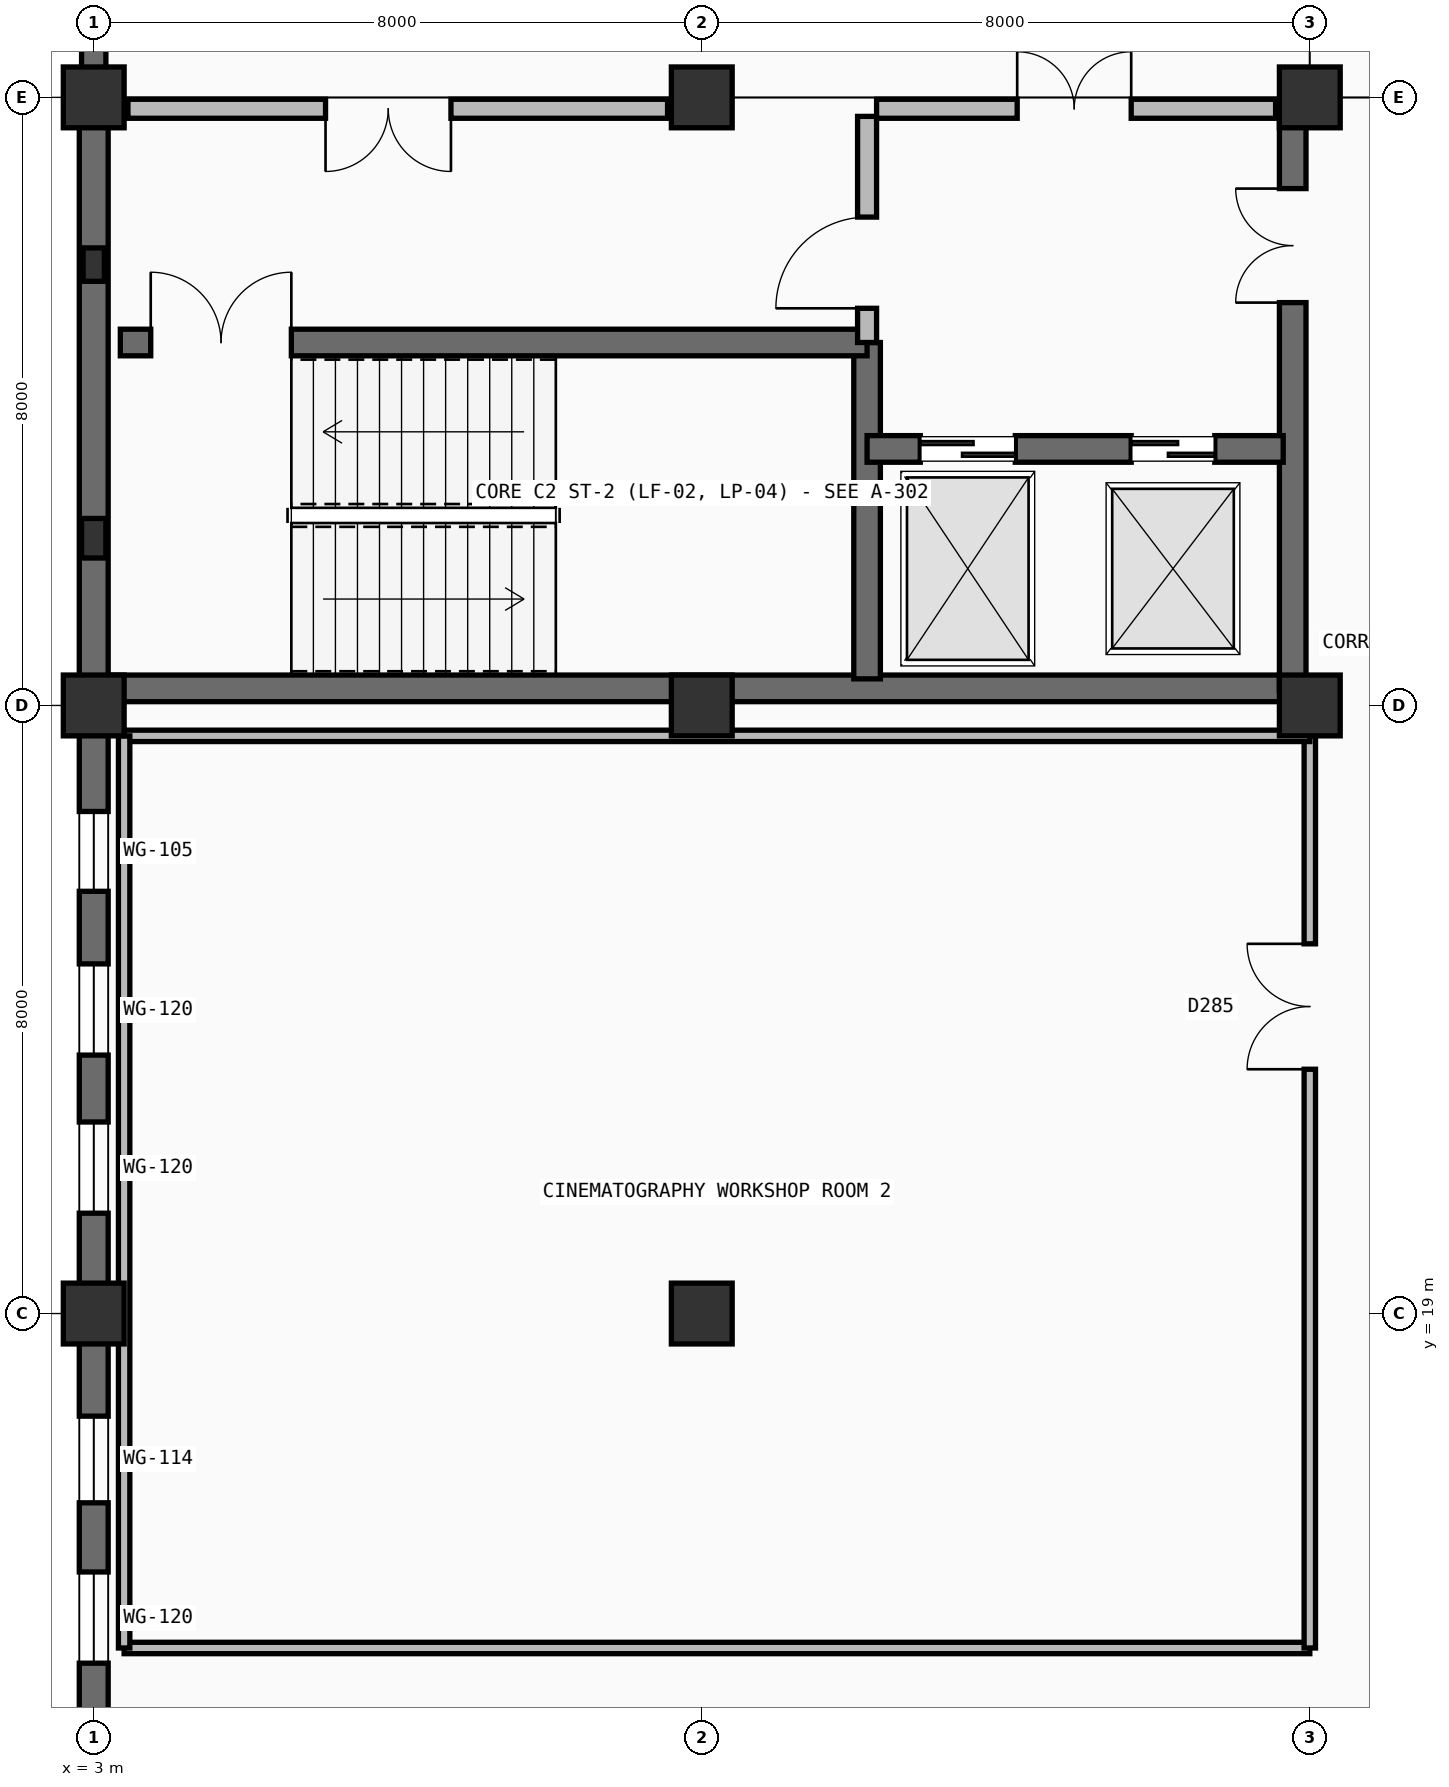
"""IFC4 building model, lengths in metres.
Left out: names, types, materials, properties, quantities, classifications, styles, units other than length and angle.
Written with IfcOpenShell. Run it as: python <this file> out.ifc"""

import sys

from ifc_helpers import new_model, si_unit, direction, frame, frame_2d, origin, origin_2d, place, context, subcontext, project, spatial, rectangle, extrude, element, fill, save


model = new_model("IFC4")
c1 = context("Model", 3, precision=1e-05, world=origin(), true_north=direction((0.0, 1.0)))
c2 = subcontext(c1, "Body", "Model", "MODEL_VIEW")
j1 = project(units=[si_unit("LENGTHUNIT", "METRE"), si_unit("PLANEANGLEUNIT", "RADIAN")], contexts=[c1])
p1 = place(None, origin())
s1 = spatial("IfcSite", under=j1, at=p1, CompositionType="ELEMENT")
p2 = place(p1, origin())
s2 = spatial("IfcBuilding", under=s1, at=p2, CompositionType="ELEMENT")
p3 = place(p2, frame((0.0, 0.0, 14.4)))
s3 = spatial("IfcBuildingStorey", under=s2, at=p3, CompositionType="ELEMENT", Elevation=14.4)
for number, where, z_axis, x_axis in (
    (1, (3.0, 19.0, 0.0), (0.0, 0.0, 1.0), (1.0, 0.0, 0.0)),
    (2, (3.0, 27.0, 0.0), (0.0, 0.0, 1.0), (1.0, 0.0, 0.0)),
    (3, (3.0, 35.0, 0.0), (0.0, 0.0, 1.0), (1.0, 0.0, 0.0)),
    (4, (11.0, 19.0, 0.0), (0.0, 0.0, 1.0), (1.0, 0.0, 0.0)),
    (5, (11.0, 27.0, 0.0), (0.0, 0.0, 1.0), (1.0, 0.0, 0.0)),
    (6, (11.0, 35.0, 0.0), (0.0, 0.0, 1.0), (1.0, 0.0, 0.0)),
    (7, (19.0, 27.0, 0.0), (0.0, 0.0, 1.0), (1.0, 0.0, 0.0)),
    (8, (19.0, 35.0, 0.0), (0.0, 0.0, 1.0), (1.0, 0.0, 0.0)),
):
    element("IfcColumn", number, at=place(p3, frame(where, z_axis=z_axis, x_axis=x_axis)), inside=s3, PredefinedType="COLUMN", context=c2, shape_type="SweptSolid", body=[
        extrude(rectangle(XDim=0.8, YDim=0.8, at=origin_2d()), origin(), (0.0, 0.0, 1.0), 4.5),
    ])
p4 = place(p3, frame((3.0, 29.2, 0.0), z_axis=(0.0, 0.0, 1.0), x_axis=(0.0, 1.0, 0.0)))
e9 = element("IfcColumn", 9, at=p4, inside=s3, PredefinedType="PILASTER", context=c2, shape_type="SweptSolid", body=[
    extrude(rectangle(XDim=0.52, YDim=0.32, at=origin_2d()), origin(), (0.0, 0.0, 1.0), 4.5),
])
p5 = place(p3, frame((3.0, 32.8, 0.0), z_axis=(0.0, 0.0, 1.0), x_axis=(0.0, 1.0, 0.0)))
e10 = element("IfcColumn", 10, at=p5, inside=s3, PredefinedType="PILASTER", context=c2, shape_type="SweptSolid", body=[
    extrude(rectangle(XDim=0.44, YDim=0.28, at=origin_2d()), origin(), (0.0, 0.0, 1.0), 4.5),
])
p6 = place(p3, frame((3.0, 11.0, 0.0), z_axis=(0.0, 0.0, 1.0), x_axis=(0.0, 1.0, 0.0)))
e11 = element("IfcWall", 11, at=p6, inside=s3, PredefinedType="SOLIDWALL", context=c2, shape_type="SweptSolid", body=[
    extrude(rectangle(XDim=8.0, YDim=0.38, at=frame_2d((4.0, 0.0))), origin(), (0.0, 0.0, 1.0), 4.5),
])
p7 = place(p6, frame((1.26, 0.0, 1.05)))
e12 = element("IfcOpeningElement", 12, at=p7, cuts=e11, PredefinedType="OPENING", context=c2, shape_type="SweptSolid", body=[
    extrude(rectangle(XDim=1.32, YDim=2.05, at=frame_2d((0.66, 1.025))), frame((0.0, 0.2, 0.0), z_axis=(0.0, -1.0, 0.0), x_axis=(1.0, 0.0, 0.0)), (0.0, 0.0, 1.0), 0.4),
])
p8 = place(p6, frame((3.4, 0.0, 1.05)))
e13 = element("IfcOpeningElement", 13, at=p8, cuts=e11, PredefinedType="OPENING", context=c2, shape_type="SweptSolid", body=[
    extrude(rectangle(XDim=1.2, YDim=1.9, at=frame_2d((0.6, 0.95))), frame((0.0, 0.2, 0.0), z_axis=(0.0, -1.0, 0.0), x_axis=(1.0, 0.0, 0.0)), (0.0, 0.0, 1.0), 0.4),
])
p9 = place(p6, frame((5.51, 0.0, 1.05)))
e14 = element("IfcOpeningElement", 14, at=p9, cuts=e11, PredefinedType="OPENING", context=c2, shape_type="SweptSolid", body=[
    extrude(rectangle(XDim=1.14, YDim=1.8, at=frame_2d((0.57, 0.9))), frame((0.0, 0.2, 0.0), z_axis=(0.0, -1.0, 0.0), x_axis=(1.0, 0.0, 0.0)), (0.0, 0.0, 1.0), 0.4),
])
p10 = place(p3, frame((3.0, 19.0, 0.0), z_axis=(0.0, 0.0, 1.0), x_axis=(0.0, 1.0, 0.0)))
e15 = element("IfcWall", 15, at=p10, inside=s3, PredefinedType="SOLIDWALL", context=c2, shape_type="SweptSolid", body=[
    extrude(rectangle(XDim=8.0, YDim=0.38, at=frame_2d((4.0, 0.0))), origin(), (0.0, 0.0, 1.0), 4.5),
])
p11 = place(p10, frame((1.32, 0.0, 1.05)))
e16 = element("IfcOpeningElement", 16, at=p11, cuts=e15, PredefinedType="OPENING", context=c2, shape_type="SweptSolid", body=[
    extrude(rectangle(XDim=1.2, YDim=1.9, at=frame_2d((0.6, 0.95))), frame((0.0, 0.2, 0.0), z_axis=(0.0, -1.0, 0.0), x_axis=(1.0, 0.0, 0.0)), (0.0, 0.0, 1.0), 0.4),
])
p12 = place(p10, frame((3.4, 0.0, 1.05)))
e17 = element("IfcOpeningElement", 17, at=p12, cuts=e15, PredefinedType="OPENING", context=c2, shape_type="SweptSolid", body=[
    extrude(rectangle(XDim=1.2, YDim=1.9, at=frame_2d((0.6, 0.95))), frame((0.0, 0.2, 0.0), z_axis=(0.0, -1.0, 0.0), x_axis=(1.0, 0.0, 0.0)), (0.0, 0.0, 1.0), 0.4),
])
p13 = place(p10, frame((5.555, 0.0, 1.05)))
e18 = element("IfcOpeningElement", 18, at=p13, cuts=e15, PredefinedType="OPENING", context=c2, shape_type="SweptSolid", body=[
    extrude(rectangle(XDim=1.05, YDim=1.7, at=frame_2d((0.525, 0.85))), frame((0.0, 0.2, 0.0), z_axis=(0.0, -1.0, 0.0), x_axis=(1.0, 0.0, 0.0)), (0.0, 0.0, 1.0), 0.4),
])
p14 = place(p3, frame((3.0, 27.0, 0.0), z_axis=(0.0, 0.0, 1.0), x_axis=(0.0, 1.0, 0.0)))
e19 = element("IfcWall", 19, at=p14, inside=s3, PredefinedType="SOLIDWALL", context=c2, shape_type="SweptSolid", body=[
    extrude(rectangle(XDim=8.0, YDim=0.38, at=frame_2d((4.0, 0.0))), origin(), (0.0, 0.0, 1.0), 4.5),
])
p15 = place(p3, frame((3.0, 35.0, 0.0), z_axis=(0.0, 0.0, 1.0), x_axis=(0.0, 1.0, 0.0)))
e20 = element("IfcWall", 20, at=p15, inside=s3, PredefinedType="SOLIDWALL", context=c2, shape_type="SweptSolid", body=[
    extrude(rectangle(XDim=8.0, YDim=0.32, at=frame_2d((4.0, 0.0))), origin(), (0.0, 0.0, 1.0), 4.5),
])
p16 = place(p15, frame((3.1, 0.0, 1.1)))
e21 = element("IfcOpeningElement", 21, at=p16, cuts=e20, PredefinedType="OPENING", context=c2, shape_type="SweptSolid", body=[
    extrude(rectangle(XDim=1.8, YDim=0.85, at=frame_2d((0.9, 0.425))), frame((0.0, 0.17, 0.0), z_axis=(0.0, -1.0, 0.0), x_axis=(1.0, 0.0, 0.0)), (0.0, 0.0, 1.0), 0.34),
])
p17 = place(p3, frame((3.2, 27.225, 0.0), z_axis=(0.0, 0.0, 1.0), x_axis=(1.0, 0.0, 0.0)))
e22 = element("IfcWall", 22, at=p17, inside=s3, PredefinedType="SHEAR", context=c2, shape_type="SweptSolid", body=[
    extrude(rectangle(XDim=15.6, YDim=0.35, at=frame_2d((7.8, 0.0))), origin(), (0.0, 0.0, 1.0), 4.2),
])
p18 = place(p3, frame((13.175, 27.35, 0.0), z_axis=(0.0, 0.0, 1.0), x_axis=(0.0, 1.0, 0.0)))
e23 = element("IfcWall", 23, at=p18, inside=s3, PredefinedType="SHEAR", context=c2, shape_type="SweptSolid", body=[
    extrude(rectangle(XDim=4.425, YDim=0.35, at=frame_2d((2.212, 0.0))), origin(), (0.0, 0.0, 1.0), 4.2),
])
p19 = place(p3, frame((18.775, 27.2, 0.0), z_axis=(0.0, 0.0, 1.0), x_axis=(0.0, 1.0, 0.0)))
e24 = element("IfcWall", 24, at=p19, inside=s3, PredefinedType="SHEAR", context=c2, shape_type="SweptSolid", body=[
    extrude(rectangle(XDim=7.6, YDim=0.35, at=frame_2d((3.8, 0.0))), origin(), (0.0, 0.0, 1.0), 4.2),
])
p20 = place(p19, frame((5.1, 0.0, 0.0)))
e25 = element("IfcOpeningElement", 25, at=p20, cuts=e24, PredefinedType="OPENING", context=c2, shape_type="SweptSolid", body=[
    extrude(rectangle(XDim=1.5, YDim=2.2, at=frame_2d((0.75, 1.1))), frame((0.0, 0.185, 0.0), z_axis=(0.0, -1.0, 0.0), x_axis=(1.0, 0.0, 0.0)), (0.0, 0.0, 1.0), 0.37),
])
p21 = place(p3, frame((3.35, 31.775, 0.0), z_axis=(0.0, 0.0, 1.0), x_axis=(1.0, 0.0, 0.0)))
e26 = element("IfcWall", 26, at=p21, inside=s3, PredefinedType="SHEAR", context=c2, shape_type="SweptSolid", body=[
    extrude(rectangle(XDim=9.825, YDim=0.35, at=frame_2d((4.913, 0.0))), origin(), (0.0, 0.0, 1.0), 4.2),
])
p22 = place(p21, frame((0.4, 0.0, 0.0)))
e27 = element("IfcOpeningElement", 27, at=p22, cuts=e26, PredefinedType="OPENING", context=c2, shape_type="SweptSolid", body=[
    extrude(rectangle(XDim=1.85, YDim=2.25, at=frame_2d((0.925, 1.125))), frame((0.0, 0.185, 0.0), z_axis=(0.0, -1.0, 0.0), x_axis=(1.0, 0.0, 0.0)), (0.0, 0.0, 1.0), 0.37),
])
p23 = place(p3, frame((13.175, 30.375, 0.0), z_axis=(0.0, 0.0, 1.0), x_axis=(1.0, 0.0, 0.0)))
e28 = element("IfcWall", 28, at=p23, inside=s3, PredefinedType="SHEAR", context=c2, shape_type="SweptSolid", body=[
    extrude(rectangle(XDim=5.475, YDim=0.35, at=frame_2d((2.737, 0.0))), origin(), (0.0, 0.0, 1.0), 4.2),
])
p24 = place(p23, frame((0.7, 0.0, 0.0)))
e29 = element("IfcOpeningElement", 29, at=p24, cuts=e28, PredefinedType="OPENING", context=c2, shape_type="SweptSolid", body=[
    extrude(rectangle(XDim=1.25, YDim=2.25, at=frame_2d((0.625, 1.125))), frame((0.0, 0.185, 0.0), z_axis=(0.0, -1.0, 0.0), x_axis=(1.0, 0.0, 0.0)), (0.0, 0.0, 1.0), 0.37),
])
p25 = place(p23, frame((3.475, 0.0, 0.0)))
e30 = element("IfcOpeningElement", 30, at=p25, cuts=e28, PredefinedType="OPENING", context=c2, shape_type="SweptSolid", body=[
    extrude(rectangle(XDim=1.1, YDim=2.2, at=frame_2d((0.55, 1.1))), frame((0.0, 0.185, 0.0), z_axis=(0.0, -1.0, 0.0), x_axis=(1.0, 0.0, 0.0)), (0.0, 0.0, 1.0), 0.37),
])
p26 = place(p3, frame((13.175, 31.775, 0.0), z_axis=(0.0, 0.0, 1.0), x_axis=(0.0, 1.0, 0.0)))
e31 = element("IfcWall", 31, at=p26, inside=s3, PredefinedType="PARTITIONING", context=c2, shape_type="SweptSolid", body=[
    extrude(rectangle(XDim=2.975, YDim=0.25, at=frame_2d((1.488, 0.0))), origin(), (0.0, 0.0, 1.0), 4.2),
])
p27 = place(p26, frame((0.45, 0.0, 0.0)))
e32 = element("IfcOpeningElement", 32, at=p27, cuts=e31, PredefinedType="OPENING", context=c2, shape_type="SweptSolid", body=[
    extrude(rectangle(XDim=1.2, YDim=2.2, at=frame_2d((0.6, 1.1))), frame((0.0, 0.135, 0.0), z_axis=(0.0, -1.0, 0.0), x_axis=(1.0, 0.0, 0.0)), (0.0, 0.0, 1.0), 0.27),
])
p28 = place(p3, frame((3.45, 34.85, 0.0), z_axis=(0.0, 0.0, 1.0), x_axis=(1.0, 0.0, 0.0)))
e33 = element("IfcWall", 33, at=p28, inside=s3, PredefinedType="PARTITIONING", context=c2, shape_type="SweptSolid", body=[
    extrude(rectangle(XDim=7.1, YDim=0.25, at=frame_2d((3.55, 0.0))), origin(), (0.0, 0.0, 1.0), 3.535),
])
p29 = place(p28, frame((2.6, 0.0, 0.0)))
e34 = element("IfcOpeningElement", 34, at=p29, cuts=e33, PredefinedType="OPENING", context=c2, shape_type="SweptSolid", body=[
    extrude(rectangle(XDim=1.65, YDim=2.25, at=frame_2d((0.825, 1.125))), frame((0.0, 0.135, 0.0), z_axis=(0.0, -1.0, 0.0), x_axis=(1.0, 0.0, 0.0)), (0.0, 0.0, 1.0), 0.27),
])
p30 = place(p3, frame((13.3, 34.85, 0.0), z_axis=(0.0, 0.0, 1.0), x_axis=(1.0, 0.0, 0.0)))
e35 = element("IfcWall", 35, at=p30, inside=s3, PredefinedType="PARTITIONING", context=c2, shape_type="SweptSolid", body=[
    extrude(rectangle(XDim=5.25, YDim=0.25, at=frame_2d((2.625, 0.0))), origin(), (0.0, 0.0, 1.0), 3.535),
])
p31 = place(p30, frame((1.85, 0.0, 0.0)))
e36 = element("IfcOpeningElement", 36, at=p31, cuts=e35, PredefinedType="OPENING", context=c2, shape_type="SweptSolid", body=[
    extrude(rectangle(XDim=1.5, YDim=2.2, at=frame_2d((0.75, 1.1))), frame((0.0, 0.135, 0.0), z_axis=(0.0, -1.0, 0.0), x_axis=(1.0, 0.0, 0.0)), (0.0, 0.0, 1.0), 0.27),
])
p32 = place(p3, frame((3.4, 14.6, 0.0), z_axis=(0.0, 0.0, 1.0), x_axis=(1.0, 0.0, 0.0)))
e37 = element("IfcWall", 37, at=p32, inside=s3, PredefinedType="PARTITIONING", context=c2, shape_type="SweptSolid", body=[
    extrude(rectangle(XDim=15.6, YDim=0.15, at=frame_2d((7.8, 0.0))), origin(), (0.0, 0.0, 1.0), 4.2),
])
p33 = place(p3, frame((19.0, 14.6, 0.0), z_axis=(0.0, 0.0, 1.0), x_axis=(0.0, 1.0, 0.0)))
e38 = element("IfcWall", 38, at=p33, inside=s3, PredefinedType="PARTITIONING", context=c2, shape_type="SweptSolid", body=[
    extrude(rectangle(XDim=12.0, YDim=0.15, at=frame_2d((6.0, 0.0))), origin(), (0.0, 0.0, 1.0), 2.935),
])
p34 = place(p33, frame((7.614, 0.0, 0.0)))
e39 = element("IfcOpeningElement", 39, at=p34, cuts=e38, PredefinedType="OPENING", context=c2, shape_type="SweptSolid", body=[
    extrude(rectangle(XDim=1.65, YDim=2.3, at=frame_2d((0.825, 1.15))), frame((0.0, 0.085, 0.0), z_axis=(0.0, -1.0, 0.0), x_axis=(1.0, 0.0, 0.0)), (0.0, 0.0, 1.0), 0.17),
])
p35 = place(p3, frame((3.4, 26.6, 0.0), z_axis=(0.0, 0.0, 1.0), x_axis=(1.0, 0.0, 0.0)))
e40 = element("IfcWall", 40, at=p35, inside=s3, PredefinedType="PARTITIONING", context=c2, shape_type="SweptSolid", body=[
    extrude(rectangle(XDim=15.6, YDim=0.15, at=frame_2d((7.8, 0.0))), origin(), (0.0, 0.0, 1.0), 3.535),
])
p36 = place(p3, frame((3.4, 14.6, 0.0), z_axis=(0.0, 0.0, 1.0), x_axis=(0.0, 1.0, 0.0)))
e41 = element("IfcWall", 41, at=p36, inside=s3, PredefinedType="PARTITIONING", context=c2, shape_type="SweptSolid", body=[
    extrude(rectangle(XDim=12.0, YDim=0.15, at=frame_2d((6.0, 0.0))), origin(), (0.0, 0.0, 1.0), 3.605),
])
p37 = place(p8, origin())
e42 = element("IfcWindow", 42, at=p37, inside=s3, PartitioningType="SINGLE_PANEL", PredefinedType="WINDOW", context=c2, shape_type="SweptSolid", body=[
    extrude(rectangle(XDim=1.2, YDim=1.9, at=frame_2d((0.6, 0.95))), frame((0.0, 0.03, 0.0), z_axis=(0.0, -1.0, 0.0), x_axis=(1.0, 0.0, 0.0)), (0.0, 0.0, 1.0), 0.06),
])
fill(e13, e42)
p38 = place(p9, origin())
e43 = element("IfcWindow", 43, at=p38, inside=s3, PartitioningType="SINGLE_PANEL", PredefinedType="WINDOW", context=c2, shape_type="SweptSolid", body=[
    extrude(rectangle(XDim=1.14, YDim=1.8, at=frame_2d((0.57, 0.9))), frame((0.0, 0.03, 0.0), z_axis=(0.0, -1.0, 0.0), x_axis=(1.0, 0.0, 0.0)), (0.0, 0.0, 1.0), 0.06),
])
fill(e14, e43)
p39 = place(p11, origin())
e44 = element("IfcWindow", 44, at=p39, inside=s3, PartitioningType="SINGLE_PANEL", PredefinedType="WINDOW", context=c2, shape_type="SweptSolid", body=[
    extrude(rectangle(XDim=1.2, YDim=1.9, at=frame_2d((0.6, 0.95))), frame((0.0, 0.03, 0.0), z_axis=(0.0, -1.0, 0.0), x_axis=(1.0, 0.0, 0.0)), (0.0, 0.0, 1.0), 0.06),
])
fill(e16, e44)
p40 = place(p12, origin())
e45 = element("IfcWindow", 45, at=p40, inside=s3, PartitioningType="SINGLE_PANEL", PredefinedType="WINDOW", context=c2, shape_type="SweptSolid", body=[
    extrude(rectangle(XDim=1.2, YDim=1.9, at=frame_2d((0.6, 0.95))), frame((0.0, 0.03, 0.0), z_axis=(0.0, -1.0, 0.0), x_axis=(1.0, 0.0, 0.0)), (0.0, 0.0, 1.0), 0.06),
])
fill(e17, e45)
p41 = place(p13, origin())
e46 = element("IfcWindow", 46, at=p41, inside=s3, PartitioningType="SINGLE_PANEL", PredefinedType="WINDOW", context=c2, shape_type="SweptSolid", body=[
    extrude(rectangle(XDim=1.05, YDim=1.7, at=frame_2d((0.525, 0.85))), frame((0.0, 0.03, 0.0), z_axis=(0.0, -1.0, 0.0), x_axis=(1.0, 0.0, 0.0)), (0.0, 0.0, 1.0), 0.06),
])
fill(e18, e46)
p42 = place(p22, origin())
e47 = element("IfcDoor", 47, at=p42, inside=s3, OperationType="DOUBLE_DOOR_SINGLE_SWING", PredefinedType="DOOR", context=c2, shape_type="SweptSolid", body=[
    extrude(rectangle(XDim=1.85, YDim=2.25, at=frame_2d((0.925, 1.125))), frame((0.0, 0.025, 0.0), z_axis=(0.0, -1.0, 0.0), x_axis=(1.0, 0.0, 0.0)), (0.0, 0.0, 1.0), 0.05),
])
fill(e27, e47)
p43 = place(p24, origin())
e48 = element("IfcDoor", 48, at=p43, inside=s3, OperationType="DOUBLE_DOOR_SLIDING", PredefinedType="DOOR", context=c2, shape_type="SweptSolid", body=[
    extrude(rectangle(XDim=1.25, YDim=2.25, at=frame_2d((0.625, 1.125))), frame((0.0, 0.025, 0.0), z_axis=(0.0, -1.0, 0.0), x_axis=(1.0, 0.0, 0.0)), (0.0, 0.0, 1.0), 0.05),
])
fill(e29, e48)
p44 = place(p25, origin())
e49 = element("IfcDoor", 49, at=p44, inside=s3, OperationType="DOUBLE_DOOR_SLIDING", PredefinedType="DOOR", context=c2, shape_type="SweptSolid", body=[
    extrude(rectangle(XDim=1.1, YDim=2.2, at=frame_2d((0.55, 1.1))), frame((0.0, 0.025, 0.0), z_axis=(0.0, -1.0, 0.0), x_axis=(1.0, 0.0, 0.0)), (0.0, 0.0, 1.0), 0.05),
])
fill(e30, e49)
p45 = place(p27, origin())
e50 = element("IfcDoor", 50, at=p45, inside=s3, OperationType="SINGLE_SWING_LEFT", PredefinedType="DOOR", context=c2, shape_type="SweptSolid", body=[
    extrude(rectangle(XDim=1.2, YDim=2.2, at=frame_2d((0.6, 1.1))), frame((0.0, 0.025, 0.0), z_axis=(0.0, -1.0, 0.0), x_axis=(1.0, 0.0, 0.0)), (0.0, 0.0, 1.0), 0.05),
])
fill(e32, e50)
p46 = place(p29, frame((1.65, 0.0, 0.0), z_axis=(0.0, 0.0, 1.0), x_axis=(-1.0, 0.0, 0.0)))
e51 = element("IfcDoor", 51, at=p46, inside=s3, OperationType="DOUBLE_DOOR_SINGLE_SWING", PredefinedType="DOOR", context=c2, shape_type="SweptSolid", body=[
    extrude(rectangle(XDim=1.65, YDim=2.25, at=frame_2d((0.825, 1.125))), frame((0.0, 0.025, 0.0), z_axis=(0.0, -1.0, 0.0), x_axis=(1.0, 0.0, 0.0)), (0.0, 0.0, 1.0), 0.05),
])
fill(e34, e51)
p47 = place(p31, origin())
e52 = element("IfcDoor", 52, at=p47, inside=s3, OperationType="DOUBLE_DOOR_SINGLE_SWING", PredefinedType="DOOR", context=c2, shape_type="SweptSolid", body=[
    extrude(rectangle(XDim=1.5, YDim=2.2, at=frame_2d((0.75, 1.1))), frame((0.0, 0.025, 0.0), z_axis=(0.0, -1.0, 0.0), x_axis=(1.0, 0.0, 0.0)), (0.0, 0.0, 1.0), 0.05),
])
fill(e36, e52)
p48 = place(p20, origin())
e53 = element("IfcDoor", 53, at=p48, inside=s3, OperationType="DOUBLE_DOOR_SINGLE_SWING", PredefinedType="DOOR", context=c2, shape_type="SweptSolid", body=[
    extrude(rectangle(XDim=1.5, YDim=2.2, at=frame_2d((0.75, 1.1))), frame((0.0, 0.025, 0.0), z_axis=(0.0, -1.0, 0.0), x_axis=(1.0, 0.0, 0.0)), (0.0, 0.0, 1.0), 0.05),
])
fill(e25, e53)
p49 = place(p34, origin())
e54 = element("IfcDoor", 54, at=p49, inside=s3, OperationType="DOUBLE_DOOR_SINGLE_SWING", PredefinedType="DOOR", context=c2, shape_type="SweptSolid", body=[
    extrude(rectangle(XDim=1.65, YDim=2.3, at=frame_2d((0.825, 1.15))), frame((0.0, 0.025, 0.0), z_axis=(0.0, -1.0, 0.0), x_axis=(1.0, 0.0, 0.0)), (0.0, 0.0, 1.0), 0.05),
])
fill(e39, e54)
save(model, sys.argv[1])
